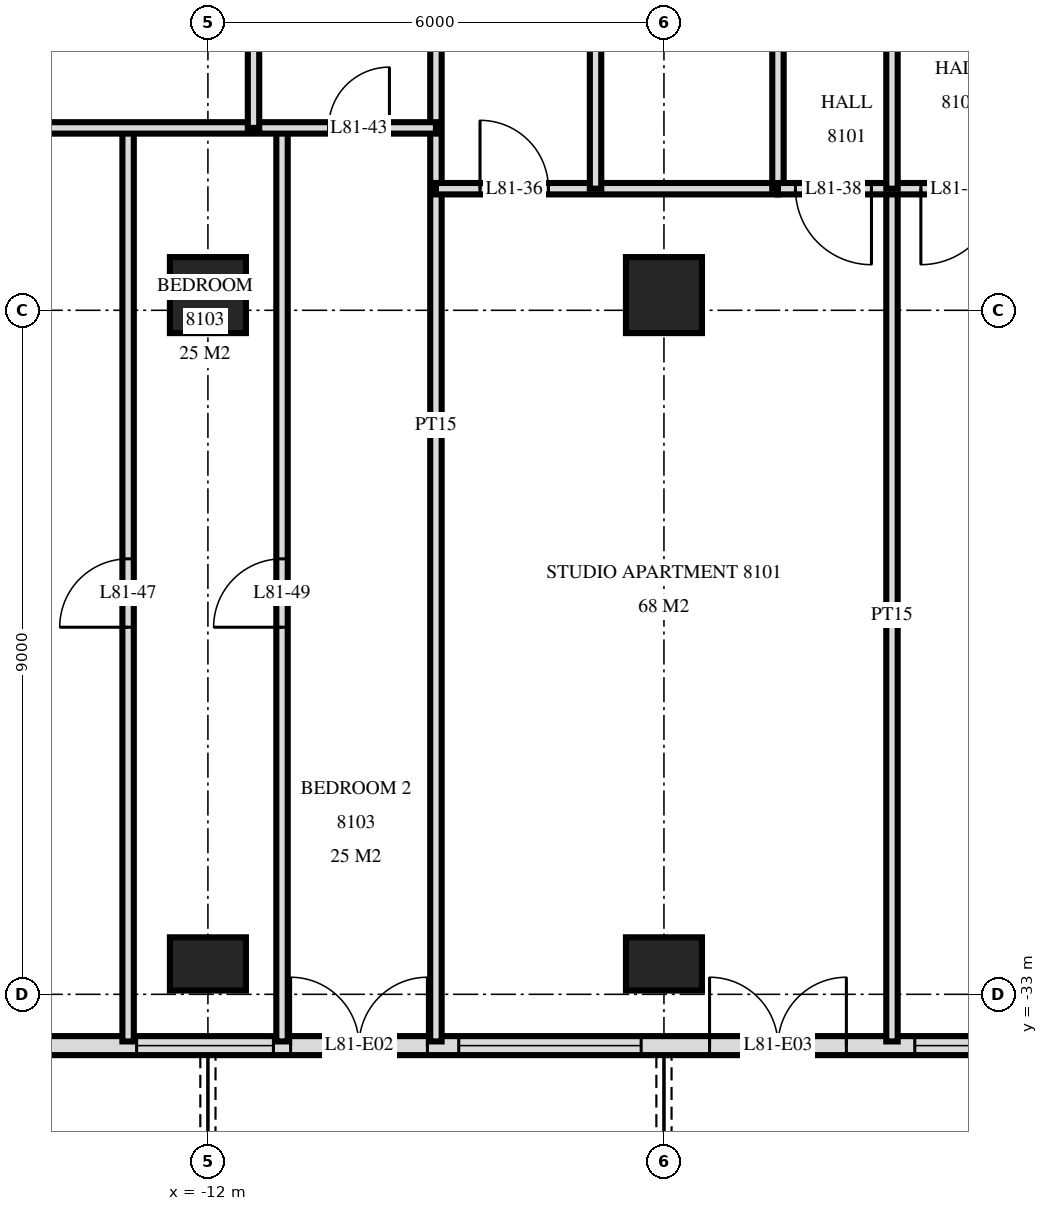
"""IFC4 building model, lengths in metres.
Left out: names, types, materials, properties, quantities, classifications, styles, units other than length and angle.
Written with IfcOpenShell. Run it as: python <this file> out.ifc"""

import sys

from ifc_helpers import new_model, si_unit, direction, frame, frame_2d, origin, origin_2d, place, context, subcontext, project, spatial, rectangle, extrude, element, fill, save


model = new_model("IFC4")
c1 = context("Model", 3, precision=1e-05, world=origin(), true_north=direction((0.0, 1.0)))
c2 = subcontext(c1, "Body", "Model", "MODEL_VIEW")
j1 = project(units=[si_unit("LENGTHUNIT", "METRE"), si_unit("PLANEANGLEUNIT", "RADIAN")], contexts=[c1])
p1 = place(None, origin())
s1 = spatial("IfcSite", under=j1, at=p1, CompositionType="ELEMENT")
p2 = place(p1, origin())
s2 = spatial("IfcBuilding", under=s1, at=p2, CompositionType="ELEMENT")
p3 = place(p2, frame((0.0, 0.0, 305.1)))
s3 = spatial("IfcBuildingStorey", under=s2, at=p3, CompositionType="ELEMENT", Elevation=305.1)
p4 = place(p3, frame((-12.0, -32.6, 0.0), z_axis=(0.0, 0.0, 1.0), x_axis=(1.0, 0.0, 0.0)))
e1 = element("IfcColumn", 1, at=p4, inside=s3, PredefinedType="COLUMN", context=c2, shape_type="SweptSolid", body=[
    extrude(rectangle(XDim=1.0, YDim=0.7, at=origin_2d()), origin(), (0.0, 0.0, 1.0), 3.5),
])
p5 = place(p3, frame((-12.0, -23.8, 0.0), z_axis=(0.0, 0.0, 1.0), x_axis=(1.0, 0.0, 0.0)))
e2 = element("IfcColumn", 2, at=p5, inside=s3, PredefinedType="COLUMN", context=c2, shape_type="SweptSolid", body=[
    extrude(rectangle(XDim=1.0, YDim=1.0, at=origin_2d()), origin(), (0.0, 0.0, 1.0), 3.5),
])
p6 = place(p3, frame((-6.0, -32.6, 0.0), z_axis=(0.0, 0.0, 1.0), x_axis=(1.0, 0.0, 0.0)))
e3 = element("IfcColumn", 3, at=p6, inside=s3, PredefinedType="COLUMN", context=c2, shape_type="SweptSolid", body=[
    extrude(rectangle(XDim=1.0, YDim=0.7, at=origin_2d()), origin(), (0.0, 0.0, 1.0), 3.5),
])
p7 = place(p3, frame((-6.0, -23.8, 0.0), z_axis=(0.0, 0.0, 1.0), x_axis=(1.0, 0.0, 0.0)))
e4 = element("IfcColumn", 4, at=p7, inside=s3, PredefinedType="COLUMN", context=c2, shape_type="SweptSolid", body=[
    extrude(rectangle(XDim=1.0, YDim=1.0, at=origin_2d()), origin(), (0.0, 0.0, 1.0), 3.5),
])
p8 = place(p3, frame((-18.575, -33.675, 0.0), z_axis=(0.0, 0.0, 1.0), x_axis=(1.0, 0.0, 0.0)))
e5 = element("IfcWall", 5, at=p8, inside=s3, PredefinedType="SOLIDWALL", context=c2, shape_type="SweptSolid", body=[
    extrude(rectangle(XDim=37.151, YDim=0.25, at=frame_2d((18.575, 0.0))), origin(), (0.0, 0.0, 1.0), 3.2),
])
p9 = place(p8, frame((1.175, 0.0, 0.0)))
e6 = element("IfcOpeningElement", 6, at=p9, cuts=e5, PredefinedType="OPENING", context=c2, shape_type="SweptSolid", body=[
    extrude(rectangle(XDim=1.8, YDim=2.4, at=frame_2d((0.9, 1.2))), frame((0.0, 0.135, 0.0), z_axis=(0.0, -1.0, 0.0), x_axis=(1.0, 0.0, 0.0)), (0.0, 0.0, 1.0), 0.27),
])
p10 = place(p8, frame((5.637, 0.0, 0.9)))
e7 = element("IfcOpeningElement", 7, at=p10, cuts=e5, PredefinedType="OPENING", context=c2, shape_type="SweptSolid", body=[
    extrude(rectangle(XDim=1.8, YDim=1.5, at=frame_2d((0.9, 0.75))), frame((0.0, 0.135, 0.0), z_axis=(0.0, -1.0, 0.0), x_axis=(1.0, 0.0, 0.0)), (0.0, 0.0, 1.0), 0.27),
])
p11 = place(p8, frame((7.663, 0.0, 0.0)))
e8 = element("IfcOpeningElement", 8, at=p11, cuts=e5, PredefinedType="OPENING", context=c2, shape_type="SweptSolid", body=[
    extrude(rectangle(XDim=1.8, YDim=2.4, at=frame_2d((0.9, 1.2))), frame((0.0, 0.135, 0.0), z_axis=(0.0, -1.0, 0.0), x_axis=(1.0, 0.0, 0.0)), (0.0, 0.0, 1.0), 0.27),
])
p12 = place(p8, frame((9.875, 0.0, 0.9)))
e9 = element("IfcOpeningElement", 9, at=p12, cuts=e5, PredefinedType="OPENING", context=c2, shape_type="SweptSolid", body=[
    extrude(rectangle(XDim=2.4, YDim=1.5, at=frame_2d((1.2, 0.75))), frame((0.0, 0.135, 0.0), z_axis=(0.0, -1.0, 0.0), x_axis=(1.0, 0.0, 0.0)), (0.0, 0.0, 1.0), 0.27),
])
p13 = place(p8, frame((13.175, 0.0, 0.0)))
e10 = element("IfcOpeningElement", 10, at=p13, cuts=e5, PredefinedType="OPENING", context=c2, shape_type="SweptSolid", body=[
    extrude(rectangle(XDim=1.8, YDim=2.4, at=frame_2d((0.9, 1.2))), frame((0.0, 0.135, 0.0), z_axis=(0.0, -1.0, 0.0), x_axis=(1.0, 0.0, 0.0)), (0.0, 0.0, 1.0), 0.27),
])
p14 = place(p8, frame((15.875, 0.0, 0.9)))
e11 = element("IfcOpeningElement", 11, at=p14, cuts=e5, PredefinedType="OPENING", context=c2, shape_type="SweptSolid", body=[
    extrude(rectangle(XDim=2.4, YDim=1.5, at=frame_2d((1.2, 0.75))), frame((0.0, 0.135, 0.0), z_axis=(0.0, -1.0, 0.0), x_axis=(1.0, 0.0, 0.0)), (0.0, 0.0, 1.0), 0.27),
])
p15 = place(p8, frame((19.175, 0.0, 0.0)))
e12 = element("IfcOpeningElement", 12, at=p15, cuts=e5, PredefinedType="OPENING", context=c2, shape_type="SweptSolid", body=[
    extrude(rectangle(XDim=1.8, YDim=2.4, at=frame_2d((0.9, 1.2))), frame((0.0, 0.135, 0.0), z_axis=(0.0, -1.0, 0.0), x_axis=(1.0, 0.0, 0.0)), (0.0, 0.0, 1.0), 0.27),
])
p16 = place(p8, frame((21.875, 0.0, 0.9)))
e13 = element("IfcOpeningElement", 13, at=p16, cuts=e5, PredefinedType="OPENING", context=c2, shape_type="SweptSolid", body=[
    extrude(rectangle(XDim=2.4, YDim=1.5, at=frame_2d((1.2, 0.75))), frame((0.0, 0.135, 0.0), z_axis=(0.0, -1.0, 0.0), x_axis=(1.0, 0.0, 0.0)), (0.0, 0.0, 1.0), 0.27),
])
p17 = place(p8, frame((25.063, 0.0, 0.9)))
e14 = element("IfcOpeningElement", 14, at=p17, cuts=e5, PredefinedType="OPENING", context=c2, shape_type="SweptSolid", body=[
    extrude(rectangle(XDim=1.8, YDim=1.5, at=frame_2d((0.9, 0.75))), frame((0.0, 0.135, 0.0), z_axis=(0.0, -1.0, 0.0), x_axis=(1.0, 0.0, 0.0)), (0.0, 0.0, 1.0), 0.27),
])
p18 = place(p8, frame((27.838, 0.0, 0.0)))
e15 = element("IfcOpeningElement", 15, at=p18, cuts=e5, PredefinedType="OPENING", context=c2, shape_type="SweptSolid", body=[
    extrude(rectangle(XDim=1.8, YDim=2.4, at=frame_2d((0.9, 1.2))), frame((0.0, 0.135, 0.0), z_axis=(0.0, -1.0, 0.0), x_axis=(1.0, 0.0, 0.0)), (0.0, 0.0, 1.0), 0.27),
])
p19 = place(p8, frame((31.175, 0.0, 0.0)))
e16 = element("IfcOpeningElement", 16, at=p19, cuts=e5, PredefinedType="OPENING", context=c2, shape_type="SweptSolid", body=[
    extrude(rectangle(XDim=1.8, YDim=2.4, at=frame_2d((0.9, 1.2))), frame((0.0, 0.135, 0.0), z_axis=(0.0, -1.0, 0.0), x_axis=(1.0, 0.0, 0.0)), (0.0, 0.0, 1.0), 0.27),
])
p20 = place(p3, frame((-3.0, -22.4, 0.0), z_axis=(0.0, 0.0, 1.0), x_axis=(0.0, 1.0, 0.0)))
e17 = element("IfcWall", 17, at=p20, inside=s3, PredefinedType="PARTITIONING", context=c2, shape_type="SweptSolid", body=[
    extrude(rectangle(XDim=5.0, YDim=0.15, at=frame_2d((2.5, 0.0))), origin(), (0.0, 0.0, 1.0), 3.22),
])
p21 = place(p3, frame((-3.0, -33.62, 0.0), z_axis=(0.0, 0.0, 1.0), x_axis=(0.0, 1.0, 0.0)))
e18 = element("IfcWall", 18, at=p21, inside=s3, PredefinedType="PARTITIONING", context=c2, shape_type="SweptSolid", body=[
    extrude(rectangle(XDim=11.22, YDim=0.15, at=frame_2d((5.61, 0.0))), origin(), (0.0, 0.0, 1.0), 3.22),
])
p22 = place(p3, frame((-4.5, -22.4, 0.0), z_axis=(0.0, 0.0, 1.0), x_axis=(0.0, 1.0, 0.0)))
e19 = element("IfcWall", 19, at=p22, inside=s3, PredefinedType="PARTITIONING", context=c2, shape_type="SweptSolid", body=[
    extrude(rectangle(XDim=5.0, YDim=0.15, at=frame_2d((2.5, 0.0))), origin(), (0.0, 0.0, 1.0), 3.22),
])
p23 = place(p22, frame((1.98, 0.0, 0.0)))
e20 = element("IfcOpeningElement", 20, at=p23, cuts=e19, PredefinedType="OPENING", context=c2, shape_type="SweptSolid", body=[
    extrude(rectangle(XDim=1.0, YDim=2.1, at=frame_2d((0.5, 1.05))), frame((0.0, 0.085, 0.0), z_axis=(0.0, -1.0, 0.0), x_axis=(1.0, 0.0, 0.0)), (0.0, 0.0, 1.0), 0.17),
])
p24 = place(p3, frame((-6.9, -22.4, 0.0), z_axis=(0.0, 0.0, 1.0), x_axis=(0.0, 1.0, 0.0)))
e21 = element("IfcWall", 21, at=p24, inside=s3, PredefinedType="PARTITIONING", context=c2, shape_type="SweptSolid", body=[
    extrude(rectangle(XDim=5.0, YDim=0.15, at=frame_2d((2.5, 0.0))), origin(), (0.0, 0.0, 1.0), 3.22),
])
p25 = place(p3, frame((-9.0, -33.62, 0.0), z_axis=(0.0, 0.0, 1.0), x_axis=(0.0, 1.0, 0.0)))
e22 = element("IfcWall", 22, at=p25, inside=s3, PredefinedType="PARTITIONING", context=c2, shape_type="SweptSolid", body=[
    extrude(rectangle(XDim=16.22, YDim=0.15, at=frame_2d((8.11, 0.0))), origin(), (0.0, 0.0, 1.0), 3.22),
])
p26 = place(p3, frame((-11.025, -33.62, 0.0), z_axis=(0.0, 0.0, 1.0), x_axis=(0.0, 1.0, 0.0)))
e23 = element("IfcWall", 23, at=p26, inside=s3, PredefinedType="PARTITIONING", context=c2, shape_type="SweptSolid", body=[
    extrude(rectangle(XDim=12.02, YDim=0.15, at=frame_2d((6.01, 0.0))), origin(), (0.0, 0.0, 1.0), 3.22),
])
p27 = place(p26, frame((5.45, 0.0, 0.0)))
e24 = element("IfcOpeningElement", 24, at=p27, cuts=e23, PredefinedType="OPENING", context=c2, shape_type="SweptSolid", body=[
    extrude(rectangle(XDim=0.9, YDim=2.1, at=frame_2d((0.45, 1.05))), frame((0.0, 0.085, 0.0), z_axis=(0.0, -1.0, 0.0), x_axis=(1.0, 0.0, 0.0)), (0.0, 0.0, 1.0), 0.17),
])
p28 = place(p3, frame((-11.4, -21.6, 0.0), z_axis=(0.0, 0.0, 1.0), x_axis=(0.0, 1.0, 0.0)))
e25 = element("IfcWall", 25, at=p28, inside=s3, PredefinedType="PARTITIONING", context=c2, shape_type="SweptSolid", body=[
    extrude(rectangle(XDim=4.2, YDim=0.15, at=frame_2d((2.1, 0.0))), origin(), (0.0, 0.0, 1.0), 3.22),
])
p29 = place(p3, frame((-13.05, -33.62, 0.0), z_axis=(0.0, 0.0, 1.0), x_axis=(0.0, 1.0, 0.0)))
e26 = element("IfcWall", 26, at=p29, inside=s3, PredefinedType="PARTITIONING", context=c2, shape_type="SweptSolid", body=[
    extrude(rectangle(XDim=12.02, YDim=0.15, at=frame_2d((6.01, 0.0))), origin(), (0.0, 0.0, 1.0), 3.22),
])
p30 = place(p29, frame((5.45, 0.0, 0.0)))
e27 = element("IfcOpeningElement", 27, at=p30, cuts=e26, PredefinedType="OPENING", context=c2, shape_type="SweptSolid", body=[
    extrude(rectangle(XDim=0.9, YDim=2.1, at=frame_2d((0.45, 1.05))), frame((0.0, 0.085, 0.0), z_axis=(0.0, -1.0, 0.0), x_axis=(1.0, 0.0, 0.0)), (0.0, 0.0, 1.0), 0.17),
])
p31 = place(p3, frame((-4.5, -22.4, 0.0), z_axis=(0.0, 0.0, 1.0), x_axis=(1.0, 0.0, 0.0)))
e28 = element("IfcWall", 28, at=p31, inside=s3, PredefinedType="PARTITIONING", context=c2, shape_type="SweptSolid", body=[
    extrude(rectangle(XDim=3.3, YDim=0.15, at=frame_2d((1.65, 0.0))), origin(), (0.0, 0.0, 1.0), 3.22),
])
p32 = place(p31, frame((0.23, 0.0, 0.0)))
e29 = element("IfcOpeningElement", 29, at=p32, cuts=e28, PredefinedType="OPENING", context=c2, shape_type="SweptSolid", body=[
    extrude(rectangle(XDim=1.0, YDim=2.1, at=frame_2d((0.5, 1.05))), frame((0.0, 0.085, 0.0), z_axis=(0.0, -1.0, 0.0), x_axis=(1.0, 0.0, 0.0)), (0.0, 0.0, 1.0), 0.17),
])
p33 = place(p31, frame((1.88, 0.0, 0.0)))
e30 = element("IfcOpeningElement", 30, at=p33, cuts=e28, PredefinedType="OPENING", context=c2, shape_type="SweptSolid", body=[
    extrude(rectangle(XDim=1.0, YDim=2.1, at=frame_2d((0.5, 1.05))), frame((0.0, 0.085, 0.0), z_axis=(0.0, -1.0, 0.0), x_axis=(1.0, 0.0, 0.0)), (0.0, 0.0, 1.0), 0.17),
])
p34 = place(p3, frame((-9.0, -22.4, 0.0), z_axis=(0.0, 0.0, 1.0), x_axis=(1.0, 0.0, 0.0)))
e31 = element("IfcWall", 31, at=p34, inside=s3, PredefinedType="PARTITIONING", context=c2, shape_type="SweptSolid", body=[
    extrude(rectangle(XDim=4.5, YDim=0.15, at=frame_2d((2.25, 0.0))), origin(), (0.0, 0.0, 1.0), 3.22),
])
p35 = place(p34, frame((0.58, 0.0, 0.0)))
e32 = element("IfcOpeningElement", 32, at=p35, cuts=e31, PredefinedType="OPENING", context=c2, shape_type="SweptSolid", body=[
    extrude(rectangle(XDim=0.9, YDim=2.1, at=frame_2d((0.45, 1.05))), frame((0.0, 0.085, 0.0), z_axis=(0.0, -1.0, 0.0), x_axis=(1.0, 0.0, 0.0)), (0.0, 0.0, 1.0), 0.17),
])
p36 = place(p3, frame((-15.0, -21.6, 0.0), z_axis=(0.0, 0.0, 1.0), x_axis=(1.0, 0.0, 0.0)))
e33 = element("IfcWall", 33, at=p36, inside=s3, PredefinedType="PARTITIONING", context=c2, shape_type="SweptSolid", body=[
    extrude(rectangle(XDim=6.0, YDim=0.15, at=frame_2d((3.0, 0.0))), origin(), (0.0, 0.0, 1.0), 3.22),
])
p37 = place(p36, frame((4.588, 0.0, 0.0)))
e34 = element("IfcOpeningElement", 34, at=p37, cuts=e33, PredefinedType="OPENING", context=c2, shape_type="SweptSolid", body=[
    extrude(rectangle(XDim=0.8, YDim=2.1, at=frame_2d((0.4, 1.05))), frame((0.0, 0.085, 0.0), z_axis=(0.0, -1.0, 0.0), x_axis=(1.0, 0.0, 0.0)), (0.0, 0.0, 1.0), 0.17),
])
p38 = place(p10, origin())
e35 = element("IfcWindow", 35, at=p38, inside=s3, PartitioningType="SINGLE_PANEL", PredefinedType="WINDOW", context=c2, shape_type="SweptSolid", body=[
    extrude(rectangle(XDim=1.8, YDim=1.5, at=frame_2d((0.9, 0.75))), frame((0.0, 0.03, 0.0), z_axis=(0.0, -1.0, 0.0), x_axis=(1.0, 0.0, 0.0)), (0.0, 0.0, 1.0), 0.06),
])
fill(e7, e35)
p39 = place(p11, origin())
e36 = element("IfcDoor", 36, at=p39, inside=s3, OperationType="DOUBLE_DOOR_SINGLE_SWING", PredefinedType="DOOR", context=c2, shape_type="SweptSolid", body=[
    extrude(rectangle(XDim=1.8, YDim=2.4, at=frame_2d((0.9, 1.2))), frame((0.0, 0.025, 0.0), z_axis=(0.0, -1.0, 0.0), x_axis=(1.0, 0.0, 0.0)), (0.0, 0.0, 1.0), 0.05),
])
fill(e8, e36)
p40 = place(p12, origin())
e37 = element("IfcWindow", 37, at=p40, inside=s3, PartitioningType="SINGLE_PANEL", PredefinedType="WINDOW", context=c2, shape_type="SweptSolid", body=[
    extrude(rectangle(XDim=2.4, YDim=1.5, at=frame_2d((1.2, 0.75))), frame((0.0, 0.03, 0.0), z_axis=(0.0, -1.0, 0.0), x_axis=(1.0, 0.0, 0.0)), (0.0, 0.0, 1.0), 0.06),
])
fill(e9, e37)
p41 = place(p13, origin())
e38 = element("IfcDoor", 38, at=p41, inside=s3, OperationType="DOUBLE_DOOR_SINGLE_SWING", PredefinedType="DOOR", context=c2, shape_type="SweptSolid", body=[
    extrude(rectangle(XDim=1.8, YDim=2.4, at=frame_2d((0.9, 1.2))), frame((0.0, 0.025, 0.0), z_axis=(0.0, -1.0, 0.0), x_axis=(1.0, 0.0, 0.0)), (0.0, 0.0, 1.0), 0.05),
])
fill(e10, e38)
p42 = place(p14, origin())
e39 = element("IfcWindow", 39, at=p42, inside=s3, PartitioningType="SINGLE_PANEL", PredefinedType="WINDOW", context=c2, shape_type="SweptSolid", body=[
    extrude(rectangle(XDim=2.4, YDim=1.5, at=frame_2d((1.2, 0.75))), frame((0.0, 0.03, 0.0), z_axis=(0.0, -1.0, 0.0), x_axis=(1.0, 0.0, 0.0)), (0.0, 0.0, 1.0), 0.06),
])
fill(e11, e39)
p43 = place(p35, origin())
e40 = element("IfcDoor", 40, at=p43, inside=s3, OperationType="SINGLE_SWING_RIGHT", PredefinedType="DOOR", context=c2, shape_type="SweptSolid", body=[
    extrude(rectangle(XDim=0.9, YDim=2.1, at=frame_2d((0.45, 1.05))), frame((0.0, 0.025, 0.0), z_axis=(0.0, -1.0, 0.0), x_axis=(1.0, 0.0, 0.0)), (0.0, 0.0, 1.0), 0.05),
])
fill(e32, e40)
p44 = place(p32, frame((0.5, 0.0, 0.0), z_axis=(0.0, 0.0, 1.0), x_axis=(-1.0, 0.0, 0.0)))
e41 = element("IfcDoor", 41, at=p44, inside=s3, OperationType="SINGLE_SWING_RIGHT", PredefinedType="DOOR", context=c2, shape_type="SweptSolid", body=[
    extrude(rectangle(XDim=1.0, YDim=2.1, at=frame_2d((0.0, 1.05))), frame((0.0, -0.025, 0.0), z_axis=(0.0, 1.0, 0.0), x_axis=(-1.0, 0.0, 0.0)), (0.0, 0.0, 1.0), 0.05),
])
fill(e29, e41)
p45 = place(p33, frame((0.5, 0.0, 0.0), z_axis=(0.0, 0.0, 1.0), x_axis=(-1.0, 0.0, 0.0)))
e42 = element("IfcDoor", 42, at=p45, inside=s3, OperationType="SINGLE_SWING_LEFT", PredefinedType="DOOR", context=c2, shape_type="SweptSolid", body=[
    extrude(rectangle(XDim=1.0, YDim=2.1, at=frame_2d((0.0, 1.05))), frame((0.0, -0.025, 0.0), z_axis=(0.0, 1.0, 0.0), x_axis=(-1.0, 0.0, 0.0)), (0.0, 0.0, 1.0), 0.05),
])
fill(e30, e42)
p46 = place(p37, origin())
e43 = element("IfcDoor", 43, at=p46, inside=s3, OperationType="SINGLE_SWING_LEFT", PredefinedType="DOOR", context=c2, shape_type="SweptSolid", body=[
    extrude(rectangle(XDim=0.8, YDim=2.1, at=frame_2d((0.4, 1.05))), frame((0.0, 0.025, 0.0), z_axis=(0.0, -1.0, 0.0), x_axis=(1.0, 0.0, 0.0)), (0.0, 0.0, 1.0), 0.05),
])
fill(e34, e43)
p47 = place(p30, origin())
e44 = element("IfcDoor", 44, at=p47, inside=s3, OperationType="SINGLE_SWING_RIGHT", PredefinedType="DOOR", context=c2, shape_type="SweptSolid", body=[
    extrude(rectangle(XDim=0.9, YDim=2.1, at=frame_2d((0.45, 1.05))), frame((0.0, 0.025, 0.0), z_axis=(0.0, -1.0, 0.0), x_axis=(1.0, 0.0, 0.0)), (0.0, 0.0, 1.0), 0.05),
])
fill(e27, e44)
p48 = place(p27, origin())
e45 = element("IfcDoor", 45, at=p48, inside=s3, OperationType="SINGLE_SWING_RIGHT", PredefinedType="DOOR", context=c2, shape_type="SweptSolid", body=[
    extrude(rectangle(XDim=0.9, YDim=2.1, at=frame_2d((0.45, 1.05))), frame((0.0, 0.025, 0.0), z_axis=(0.0, -1.0, 0.0), x_axis=(1.0, 0.0, 0.0)), (0.0, 0.0, 1.0), 0.05),
])
fill(e24, e45)
save(model, sys.argv[1])
